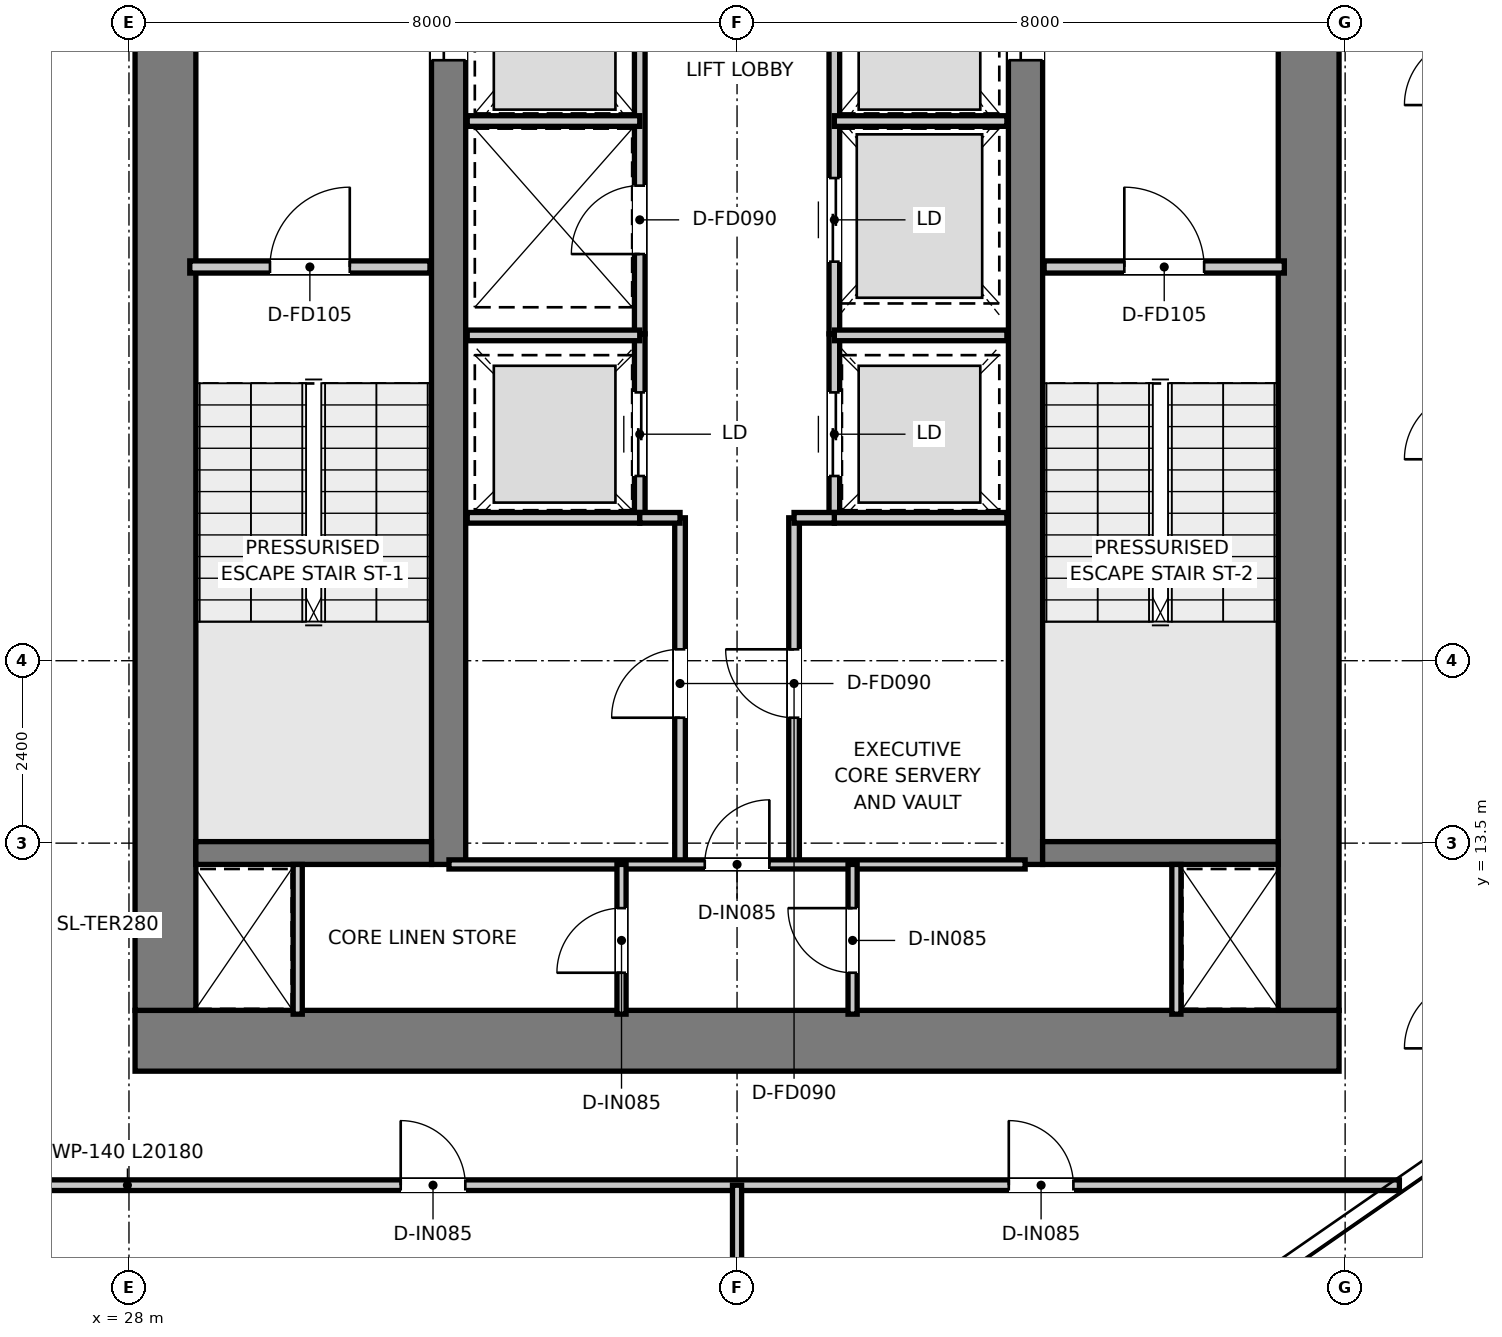
"""IFC4 building model, lengths in metres.
Left out: names, types, materials, properties, quantities, classifications, styles, units other than length and angle.
Written with IfcOpenShell. Run it as: python <this file> out.ifc"""

import sys

from ifc_helpers import new_model, si_unit, direction, frame, frame_2d, origin, place, context, subcontext, project, spatial, rectangle, extrude, element, fill, save


model = new_model("IFC4")
c1 = context("Model", 3, precision=1e-05, world=origin(), true_north=direction((0.0, 1.0)))
c2 = subcontext(c1, "Body", "Model", "MODEL_VIEW")
j1 = project(units=[si_unit("LENGTHUNIT", "METRE"), si_unit("PLANEANGLEUNIT", "RADIAN")], contexts=[c1])
p1 = place(None, origin())
s1 = spatial("IfcSite", under=j1, at=p1, CompositionType="ELEMENT")
p2 = place(p1, origin())
s2 = spatial("IfcBuilding", under=s1, at=p2, CompositionType="ELEMENT")
p3 = place(p2, frame((0.0, 0.0, 271.35)))
s3 = spatial("IfcBuildingStorey", under=s2, at=p3, CompositionType="ELEMENT", Elevation=271.35)
p4 = place(p3, frame((28.08, 10.9, 0.0), z_axis=(0.0, 0.0, 1.0), x_axis=(1.0, 0.0, 0.0)))
e1 = element("IfcWall", 1, at=p4, inside=s3, PredefinedType="SHEAR", context=c2, shape_type="SweptSolid", body=[
    extrude(rectangle(XDim=15.84, YDim=0.8, at=frame_2d((7.92, 0.0))), origin(), (0.0, 0.0, 1.0), 3.95),
])
for number, where, z_axis, x_axis in (
    (2, (28.48, 11.3, 0.0), (0.0, 0.0, 1.0), (0.0, 1.0, 0.0)),
    (3, (43.52, 11.3, 0.0), (0.0, 0.0, 1.0), (0.0, 1.0, 0.0)),
):
    element("IfcWall", number, at=place(p3, frame(where, z_axis=z_axis, x_axis=x_axis)), inside=s3, PredefinedType="SHEAR", context=c2, shape_type="SweptSolid", body=[
        extrude(rectangle(XDim=14.7, YDim=0.8, at=frame_2d((7.35, 0.0))), origin(), (0.0, 0.0, 1.0), 3.95),
    ])
p5 = place(p3, frame((32.205, 13.22, 0.0), z_axis=(0.0, 0.0, 1.0), x_axis=(0.0, 1.0, 0.0)))
e4 = element("IfcWall", 4, at=p5, inside=s3, PredefinedType="SHEAR", context=c2, shape_type="SweptSolid", body=[
    extrude(rectangle(XDim=12.78, YDim=0.45, at=frame_2d((6.39, 0.0))), origin(), (0.0, 0.0, 1.0), 3.95),
])
p6 = place(p5, frame((10.58, 0.0, 0.0)))
e5 = element("IfcOpeningElement", 5, at=p6, cuts=e4, PredefinedType="OPENING", context=c2, shape_type="SweptSolid", body=[
    extrude(rectangle(XDim=1.1, YDim=2.15, at=frame_2d((0.55, 1.075))), frame((0.0, 0.235, 0.0), z_axis=(0.0, -1.0, 0.0), x_axis=(1.0, 0.0, 0.0)), (0.0, 0.0, 1.0), 0.47),
])
p7 = place(p3, frame((39.795, 13.22, 0.0), z_axis=(0.0, 0.0, 1.0), x_axis=(0.0, 1.0, 0.0)))
e6 = element("IfcWall", 6, at=p7, inside=s3, PredefinedType="SHEAR", context=c2, shape_type="SweptSolid", body=[
    extrude(rectangle(XDim=12.78, YDim=0.45, at=frame_2d((6.39, 0.0))), origin(), (0.0, 0.0, 1.0), 3.95),
])
p8 = place(p7, frame((10.58, 0.0, 0.0)))
e7 = element("IfcOpeningElement", 7, at=p8, cuts=e6, PredefinedType="OPENING", context=c2, shape_type="SweptSolid", body=[
    extrude(rectangle(XDim=1.1, YDim=2.15, at=frame_2d((0.55, 1.075))), frame((0.0, 0.235, 0.0), z_axis=(0.0, -1.0, 0.0), x_axis=(1.0, 0.0, 0.0)), (0.0, 0.0, 1.0), 0.47),
])
for number, where, z_axis, x_axis in (
    (8, (28.88, 13.37, 0.0), (0.0, 0.0, 1.0), (1.0, 0.0, 0.0)),
    (9, (40.02, 13.37, 0.0), (0.0, 0.0, 1.0), (1.0, 0.0, 0.0)),
):
    element("IfcWall", number, at=place(p3, frame(where, z_axis=z_axis, x_axis=x_axis)), inside=s3, PredefinedType="SHEAR", context=c2, shape_type="SweptSolid", body=[
        extrude(rectangle(XDim=3.1, YDim=0.3, at=frame_2d((1.55, 0.0))), origin(), (0.0, 0.0, 1.0), 3.95),
    ])
p9 = place(p3, frame((28.8, 21.08, 0.0), z_axis=(0.0, 0.0, 1.0), x_axis=(1.0, 0.0, 0.0)))
e10 = element("IfcWall", 10, at=p9, inside=s3, PredefinedType="PARTITIONING", context=c2, shape_type="SweptSolid", body=[
    extrude(rectangle(XDim=3.16, YDim=0.16, at=frame_2d((1.58, 0.0))), origin(), (0.0, 0.0, 1.0), 3.67),
])
p10 = place(p9, frame((1.055, 0.0, 0.0)))
e11 = element("IfcOpeningElement", 11, at=p10, cuts=e10, PredefinedType="OPENING", context=c2, shape_type="SweptSolid", body=[
    extrude(rectangle(XDim=1.05, YDim=2.1, at=frame_2d((0.525, 1.05))), frame((0.0, 0.09, 0.0), z_axis=(0.0, -1.0, 0.0), x_axis=(1.0, 0.0, 0.0)), (0.0, 0.0, 1.0), 0.18),
])
p11 = place(p3, frame((40.04, 21.08, 0.0), z_axis=(0.0, 0.0, 1.0), x_axis=(1.0, 0.0, 0.0)))
e12 = element("IfcWall", 12, at=p11, inside=s3, PredefinedType="PARTITIONING", context=c2, shape_type="SweptSolid", body=[
    extrude(rectangle(XDim=3.16, YDim=0.16, at=frame_2d((1.58, 0.0))), origin(), (0.0, 0.0, 1.0), 3.67),
])
p12 = place(p11, frame((1.055, 0.0, 0.0)))
e13 = element("IfcOpeningElement", 13, at=p12, cuts=e12, PredefinedType="OPENING", context=c2, shape_type="SweptSolid", body=[
    extrude(rectangle(XDim=1.05, YDim=2.1, at=frame_2d((0.525, 1.05))), frame((0.0, 0.09, 0.0), z_axis=(0.0, -1.0, 0.0), x_axis=(1.0, 0.0, 0.0)), (0.0, 0.0, 1.0), 0.18),
])
p13 = place(p3, frame((34.72, 20.2, 0.0), z_axis=(0.0, 0.0, 1.0), x_axis=(0.0, 1.0, 0.0)))
e14 = element("IfcWall", 14, at=p13, inside=s3, PredefinedType="PARTITIONING", context=c2, shape_type="SweptSolid", body=[
    extrude(rectangle(XDim=5.78, YDim=0.14, at=frame_2d((2.89, 0.0))), origin(), (0.0, 0.0, 1.0), 2.82),
])
p14 = place(p13, frame((1.05, 0.0, 0.0)))
e15 = element("IfcOpeningElement", 15, at=p14, cuts=e14, PredefinedType="OPENING", context=c2, shape_type="SweptSolid", body=[
    extrude(rectangle(XDim=0.9, YDim=2.1, at=frame_2d((0.45, 1.05))), frame((0.0, 0.08, 0.0), z_axis=(0.0, -1.0, 0.0), x_axis=(1.0, 0.0, 0.0)), (0.0, 0.0, 1.0), 0.16),
])
p15 = place(p3, frame((37.28, 20.2, 0.0), z_axis=(0.0, 0.0, 1.0), x_axis=(0.0, 1.0, 0.0)))
e16 = element("IfcWall", 16, at=p15, inside=s3, PredefinedType="PARTITIONING", context=c2, shape_type="SweptSolid", body=[
    extrude(rectangle(XDim=5.78, YDim=0.14, at=frame_2d((2.89, 0.0))), origin(), (0.0, 0.0, 1.0), 2.82),
])
p16 = place(p15, frame((0.95, 0.0, 0.0)))
e17 = element("IfcOpeningElement", 17, at=p16, cuts=e16, PredefinedType="OPENING", context=c2, shape_type="SweptSolid", body=[
    extrude(rectangle(XDim=1.1, YDim=2.15, at=frame_2d((0.55, 1.075))), frame((0.0, 0.08, 0.0), z_axis=(0.0, -1.0, 0.0), x_axis=(1.0, 0.0, 0.0)), (0.0, 0.0, 1.0), 0.16),
])
for number, where, z_axis, x_axis in (
    (18, (32.45, 23.0, 0.0), (0.0, 0.0, 1.0), (1.0, 0.0, 0.0)),
    (19, (37.28, 23.0, 0.0), (0.0, 0.0, 1.0), (1.0, 0.0, 0.0)),
):
    element("IfcWall", number, at=place(p3, frame(where, z_axis=z_axis, x_axis=x_axis)), inside=s3, PredefinedType="PARTITIONING", context=c2, shape_type="SweptSolid", body=[
        extrude(rectangle(XDim=2.27, YDim=0.14, at=frame_2d((1.135, 0.0))), origin(), (0.0, 0.0, 1.0), 2.82),
    ])
p17 = place(p3, frame((34.72, 17.78, 0.0), z_axis=(0.0, 0.0, 1.0), x_axis=(0.0, 1.0, 0.0)))
e20 = element("IfcWall", 20, at=p17, inside=s3, PredefinedType="PARTITIONING", context=c2, shape_type="SweptSolid", body=[
    extrude(rectangle(XDim=2.42, YDim=0.14, at=frame_2d((1.21, 0.0))), origin(), (0.0, 0.0, 1.0), 3.67),
])
p18 = place(p17, frame((0.55, 0.0, 0.0)))
e21 = element("IfcOpeningElement", 21, at=p18, cuts=e20, PredefinedType="OPENING", context=c2, shape_type="SweptSolid", body=[
    extrude(rectangle(XDim=1.1, YDim=2.15, at=frame_2d((0.55, 1.075))), frame((0.0, 0.08, 0.0), z_axis=(0.0, -1.0, 0.0), x_axis=(1.0, 0.0, 0.0)), (0.0, 0.0, 1.0), 0.16),
])
p19 = place(p3, frame((37.28, 17.78, 0.0), z_axis=(0.0, 0.0, 1.0), x_axis=(0.0, 1.0, 0.0)))
e22 = element("IfcWall", 22, at=p19, inside=s3, PredefinedType="PARTITIONING", context=c2, shape_type="SweptSolid", body=[
    extrude(rectangle(XDim=2.42, YDim=0.14, at=frame_2d((1.21, 0.0))), origin(), (0.0, 0.0, 1.0), 3.67),
])
p20 = place(p19, frame((0.55, 0.0, 0.0)))
e23 = element("IfcOpeningElement", 23, at=p20, cuts=e22, PredefinedType="OPENING", context=c2, shape_type="SweptSolid", body=[
    extrude(rectangle(XDim=1.1, YDim=2.15, at=frame_2d((0.55, 1.075))), frame((0.0, 0.08, 0.0), z_axis=(0.0, -1.0, 0.0), x_axis=(1.0, 0.0, 0.0)), (0.0, 0.0, 1.0), 0.16),
])
for number, where, z_axis, x_axis in (
    (24, (32.45, 17.78, 0.0), (0.0, 0.0, 1.0), (1.0, 0.0, 0.0)),
    (25, (32.45, 20.18, 0.0), (0.0, 0.0, 1.0), (1.0, 0.0, 0.0)),
    (26, (37.28, 17.78, 0.0), (0.0, 0.0, 1.0), (1.0, 0.0, 0.0)),
    (27, (37.28, 20.18, 0.0), (0.0, 0.0, 1.0), (1.0, 0.0, 0.0)),
):
    element("IfcWall", number, at=place(p3, frame(where, z_axis=z_axis, x_axis=x_axis)), inside=s3, PredefinedType="PARTITIONING", context=c2, shape_type="SweptSolid", body=[
        extrude(rectangle(XDim=2.27, YDim=0.14, at=frame_2d((1.135, 0.0))), origin(), (0.0, 0.0, 1.0), 3.67),
    ])
p21 = place(p3, frame((35.25, 13.22, 0.0), z_axis=(0.0, 0.0, 1.0), x_axis=(0.0, 1.0, 0.0)))
e28 = element("IfcWall", 28, at=p21, inside=s3, PredefinedType="PARTITIONING", context=c2, shape_type="SweptSolid", body=[
    extrude(rectangle(XDim=4.56, YDim=0.14, at=frame_2d((2.28, 0.0))), origin(), (0.0, 0.0, 1.0), 3.67),
])
p22 = place(p21, frame((1.93, 0.0, 0.0)))
e29 = element("IfcOpeningElement", 29, at=p22, cuts=e28, PredefinedType="OPENING", context=c2, shape_type="SweptSolid", body=[
    extrude(rectangle(XDim=0.9, YDim=2.1, at=frame_2d((0.45, 1.05))), frame((0.0, 0.08, 0.0), z_axis=(0.0, -1.0, 0.0), x_axis=(1.0, 0.0, 0.0)), (0.0, 0.0, 1.0), 0.16),
])
p23 = place(p3, frame((34.72, 17.78, 0.0), z_axis=(0.0, 0.0, 1.0), x_axis=(1.0, 0.0, 0.0)))
e30 = element("IfcWall", 30, at=p23, inside=s3, PredefinedType="PARTITIONING", context=c2, shape_type="SweptSolid", body=[
    extrude(rectangle(XDim=0.53, YDim=0.14, at=frame_2d((0.265, 0.0))), origin(), (0.0, 0.0, 1.0), 3.67),
])
p24 = place(p3, frame((36.75, 13.22, 0.0), z_axis=(0.0, 0.0, 1.0), x_axis=(0.0, 1.0, 0.0)))
e31 = element("IfcWall", 31, at=p24, inside=s3, PredefinedType="PARTITIONING", context=c2, shape_type="SweptSolid", body=[
    extrude(rectangle(XDim=4.56, YDim=0.14, at=frame_2d((2.28, 0.0))), origin(), (0.0, 0.0, 1.0), 3.67),
])
p25 = place(p24, frame((1.93, 0.0, 0.0)))
e32 = element("IfcOpeningElement", 32, at=p25, cuts=e31, PredefinedType="OPENING", context=c2, shape_type="SweptSolid", body=[
    extrude(rectangle(XDim=0.9, YDim=2.1, at=frame_2d((0.45, 1.05))), frame((0.0, 0.08, 0.0), z_axis=(0.0, -1.0, 0.0), x_axis=(1.0, 0.0, 0.0)), (0.0, 0.0, 1.0), 0.16),
])
p26 = place(p3, frame((36.75, 17.78, 0.0), z_axis=(0.0, 0.0, 1.0), x_axis=(1.0, 0.0, 0.0)))
e33 = element("IfcWall", 33, at=p26, inside=s3, PredefinedType="PARTITIONING", context=c2, shape_type="SweptSolid", body=[
    extrude(rectangle(XDim=0.53, YDim=0.14, at=frame_2d((0.265, 0.0))), origin(), (0.0, 0.0, 1.0), 3.67),
])
for number, where, z_axis, x_axis in (
    (34, (30.22, 11.25, 0.0), (0.0, 0.0, 1.0), (0.0, 1.0, 0.0)),
    (35, (41.78, 11.25, 0.0), (0.0, 0.0, 1.0), (0.0, 1.0, 0.0)),
):
    element("IfcWall", number, at=place(p3, frame(where, z_axis=z_axis, x_axis=x_axis)), inside=s3, PredefinedType="PARTITIONING", context=c2, shape_type="SweptSolid", body=[
        extrude(rectangle(XDim=1.97, YDim=0.12, at=frame_2d((0.985, 0.0))), origin(), (0.0, 0.0, 1.0), 3.67),
    ])
p27 = place(p3, frame((32.21, 13.22, 0.0), z_axis=(0.0, 0.0, 1.0), x_axis=(1.0, 0.0, 0.0)))
e36 = element("IfcWall", 36, at=p27, inside=s3, PredefinedType="PARTITIONING", context=c2, shape_type="SweptSolid", body=[
    extrude(rectangle(XDim=7.58, YDim=0.12, at=frame_2d((3.79, 0.0))), origin(), (0.0, 0.0, 1.0), 3.67),
])
p28 = place(p27, frame((3.365, 0.0, 0.0)))
e37 = element("IfcOpeningElement", 37, at=p28, cuts=e36, PredefinedType="OPENING", context=c2, shape_type="SweptSolid", body=[
    extrude(rectangle(XDim=0.85, YDim=2.1, at=frame_2d((0.425, 1.05))), frame((0.0, 0.07, 0.0), z_axis=(0.0, -1.0, 0.0), x_axis=(1.0, 0.0, 0.0)), (0.0, 0.0, 1.0), 0.14),
])
p29 = place(p3, frame((34.48, 11.25, 0.0), z_axis=(0.0, 0.0, 1.0), x_axis=(0.0, 1.0, 0.0)))
e38 = element("IfcWall", 38, at=p29, inside=s3, PredefinedType="PARTITIONING", context=c2, shape_type="SweptSolid", body=[
    extrude(rectangle(XDim=1.97, YDim=0.12, at=frame_2d((0.985, 0.0))), origin(), (0.0, 0.0, 1.0), 3.67),
])
p30 = place(p29, frame((0.545, 0.0, 0.0)))
e39 = element("IfcOpeningElement", 39, at=p30, cuts=e38, PredefinedType="OPENING", context=c2, shape_type="SweptSolid", body=[
    extrude(rectangle(XDim=0.85, YDim=2.1, at=frame_2d((0.425, 1.05))), frame((0.0, 0.07, 0.0), z_axis=(0.0, -1.0, 0.0), x_axis=(1.0, 0.0, 0.0)), (0.0, 0.0, 1.0), 0.14),
])
p31 = place(p3, frame((37.52, 11.25, 0.0), z_axis=(0.0, 0.0, 1.0), x_axis=(0.0, 1.0, 0.0)))
e40 = element("IfcWall", 40, at=p31, inside=s3, PredefinedType="PARTITIONING", context=c2, shape_type="SweptSolid", body=[
    extrude(rectangle(XDim=1.97, YDim=0.12, at=frame_2d((0.985, 0.0))), origin(), (0.0, 0.0, 1.0), 3.67),
])
p32 = place(p31, frame((0.545, 0.0, 0.0)))
e41 = element("IfcOpeningElement", 41, at=p32, cuts=e40, PredefinedType="OPENING", context=c2, shape_type="SweptSolid", body=[
    extrude(rectangle(XDim=0.85, YDim=2.1, at=frame_2d((0.425, 1.05))), frame((0.0, 0.07, 0.0), z_axis=(0.0, -1.0, 0.0), x_axis=(1.0, 0.0, 0.0)), (0.0, 0.0, 1.0), 0.14),
])
p33 = place(p3, frame((24.534, 9.0, 0.0), z_axis=(0.0, 0.0, 1.0), x_axis=(1.0, 0.0, 0.0)))
e42 = element("IfcWall", 42, at=p33, inside=s3, PredefinedType="PARTITIONING", context=c2, shape_type="SweptSolid", body=[
    extrude(rectangle(XDim=20.18, YDim=0.14, at=frame_2d((10.09, 0.0))), origin(), (0.0, 0.0, 1.0), 3.67),
])
p34 = place(p33, frame((7.041, 0.0, 0.0)))
e43 = element("IfcOpeningElement", 43, at=p34, cuts=e42, PredefinedType="OPENING", context=c2, shape_type="SweptSolid", body=[
    extrude(rectangle(XDim=0.85, YDim=2.1, at=frame_2d((0.425, 1.05))), frame((0.0, 0.08, 0.0), z_axis=(0.0, -1.0, 0.0), x_axis=(1.0, 0.0, 0.0)), (0.0, 0.0, 1.0), 0.16),
])
p35 = place(p33, frame((15.041, 0.0, 0.0)))
e44 = element("IfcOpeningElement", 44, at=p35, cuts=e42, PredefinedType="OPENING", context=c2, shape_type="SweptSolid", body=[
    extrude(rectangle(XDim=0.85, YDim=2.1, at=frame_2d((0.425, 1.05))), frame((0.0, 0.08, 0.0), z_axis=(0.0, -1.0, 0.0), x_axis=(1.0, 0.0, 0.0)), (0.0, 0.0, 1.0), 0.16),
])
p36 = place(p3, frame((36.0, 2.955, 0.0), z_axis=(0.0, 0.0, 1.0), x_axis=(0.0, 1.0, 0.0)))
e45 = element("IfcWall", 45, at=p36, inside=s3, PredefinedType="PARTITIONING", context=c2, shape_type="SweptSolid", body=[
    extrude(rectangle(XDim=6.045, YDim=0.12, at=frame_2d((3.022, 0.0))), origin(), (0.0, 0.0, 1.0), 3.67),
])
p37 = place(p10, origin())
e46 = element("IfcDoor", 46, at=p37, inside=s3, OperationType="SINGLE_SWING_RIGHT", PredefinedType="DOOR", context=c2, shape_type="SweptSolid", body=[
    extrude(rectangle(XDim=1.05, YDim=2.1, at=frame_2d((0.525, 1.05))), frame((0.0, 0.025, 0.0), z_axis=(0.0, -1.0, 0.0), x_axis=(1.0, 0.0, 0.0)), (0.0, 0.0, 1.0), 0.05),
])
fill(e11, e46)
p38 = place(p12, origin())
e47 = element("IfcDoor", 47, at=p38, inside=s3, OperationType="SINGLE_SWING_LEFT", PredefinedType="DOOR", context=c2, shape_type="SweptSolid", body=[
    extrude(rectangle(XDim=1.05, YDim=2.1, at=frame_2d((0.525, 1.05))), frame((0.0, 0.025, 0.0), z_axis=(0.0, -1.0, 0.0), x_axis=(1.0, 0.0, 0.0)), (0.0, 0.0, 1.0), 0.05),
])
fill(e13, e47)
p39 = place(p6, origin())
e48 = element("IfcDoor", 48, at=p39, inside=s3, OperationType="DOUBLE_DOOR_SLIDING", PredefinedType="DOOR", context=c2, shape_type="SweptSolid", body=[
    extrude(rectangle(XDim=1.1, YDim=2.15, at=frame_2d((0.55, 1.075))), frame((0.0, 0.025, 0.0), z_axis=(0.0, -1.0, 0.0), x_axis=(1.0, 0.0, 0.0)), (0.0, 0.0, 1.0), 0.05),
])
fill(e5, e48)
p40 = place(p8, origin())
e49 = element("IfcDoor", 49, at=p40, inside=s3, OperationType="DOUBLE_DOOR_SLIDING", PredefinedType="DOOR", context=c2, shape_type="SweptSolid", body=[
    extrude(rectangle(XDim=1.1, YDim=2.15, at=frame_2d((0.55, 1.075))), frame((0.0, 0.025, 0.0), z_axis=(0.0, -1.0, 0.0), x_axis=(1.0, 0.0, 0.0)), (0.0, 0.0, 1.0), 0.05),
])
fill(e7, e49)
p41 = place(p14, origin())
e50 = element("IfcDoor", 50, at=p41, inside=s3, OperationType="SINGLE_SWING_LEFT", PredefinedType="DOOR", context=c2, shape_type="SweptSolid", body=[
    extrude(rectangle(XDim=0.9, YDim=2.1, at=frame_2d((0.45, 1.05))), frame((0.0, 0.025, 0.0), z_axis=(0.0, -1.0, 0.0), x_axis=(1.0, 0.0, 0.0)), (0.0, 0.0, 1.0), 0.05),
])
fill(e15, e50)
p42 = place(p16, origin())
e51 = element("IfcDoor", 51, at=p42, inside=s3, OperationType="DOUBLE_DOOR_SLIDING", PredefinedType="DOOR", context=c2, shape_type="SweptSolid", body=[
    extrude(rectangle(XDim=1.1, YDim=2.15, at=frame_2d((0.55, 1.075))), frame((0.0, 0.025, 0.0), z_axis=(0.0, -1.0, 0.0), x_axis=(1.0, 0.0, 0.0)), (0.0, 0.0, 1.0), 0.05),
])
fill(e17, e51)
p43 = place(p18, origin())
e52 = element("IfcDoor", 52, at=p43, inside=s3, OperationType="DOUBLE_DOOR_SLIDING", PredefinedType="DOOR", context=c2, shape_type="SweptSolid", body=[
    extrude(rectangle(XDim=1.1, YDim=2.15, at=frame_2d((0.55, 1.075))), frame((0.0, 0.025, 0.0), z_axis=(0.0, -1.0, 0.0), x_axis=(1.0, 0.0, 0.0)), (0.0, 0.0, 1.0), 0.05),
])
fill(e21, e52)
p44 = place(p20, origin())
e53 = element("IfcDoor", 53, at=p44, inside=s3, OperationType="DOUBLE_DOOR_SLIDING", PredefinedType="DOOR", context=c2, shape_type="SweptSolid", body=[
    extrude(rectangle(XDim=1.1, YDim=2.15, at=frame_2d((0.55, 1.075))), frame((0.0, 0.025, 0.0), z_axis=(0.0, -1.0, 0.0), x_axis=(1.0, 0.0, 0.0)), (0.0, 0.0, 1.0), 0.05),
])
fill(e23, e53)
p45 = place(p22, origin())
e54 = element("IfcDoor", 54, at=p45, inside=s3, OperationType="SINGLE_SWING_LEFT", PredefinedType="DOOR", context=c2, shape_type="SweptSolid", body=[
    extrude(rectangle(XDim=0.9, YDim=2.1, at=frame_2d((0.45, 1.05))), frame((0.0, 0.025, 0.0), z_axis=(0.0, -1.0, 0.0), x_axis=(1.0, 0.0, 0.0)), (0.0, 0.0, 1.0), 0.05),
])
fill(e29, e54)
p46 = place(p25, origin())
e55 = element("IfcDoor", 55, at=p46, inside=s3, OperationType="SINGLE_SWING_RIGHT", PredefinedType="DOOR", context=c2, shape_type="SweptSolid", body=[
    extrude(rectangle(XDim=0.9, YDim=2.1, at=frame_2d((0.45, 1.05))), frame((0.0, 0.025, 0.0), z_axis=(0.0, -1.0, 0.0), x_axis=(1.0, 0.0, 0.0)), (0.0, 0.0, 1.0), 0.05),
])
fill(e32, e55)
p47 = place(p28, origin())
e56 = element("IfcDoor", 56, at=p47, inside=s3, OperationType="SINGLE_SWING_RIGHT", PredefinedType="DOOR", context=c2, shape_type="SweptSolid", body=[
    extrude(rectangle(XDim=0.85, YDim=2.1, at=frame_2d((0.425, 1.05))), frame((0.0, 0.025, 0.0), z_axis=(0.0, -1.0, 0.0), x_axis=(1.0, 0.0, 0.0)), (0.0, 0.0, 1.0), 0.05),
])
fill(e37, e56)
p48 = place(p30, origin())
e57 = element("IfcDoor", 57, at=p48, inside=s3, OperationType="SINGLE_SWING_LEFT", PredefinedType="DOOR", context=c2, shape_type="SweptSolid", body=[
    extrude(rectangle(XDim=0.85, YDim=2.1, at=frame_2d((0.425, 1.05))), frame((0.0, 0.025, 0.0), z_axis=(0.0, -1.0, 0.0), x_axis=(1.0, 0.0, 0.0)), (0.0, 0.0, 1.0), 0.05),
])
fill(e39, e57)
p49 = place(p32, origin())
e58 = element("IfcDoor", 58, at=p49, inside=s3, OperationType="SINGLE_SWING_RIGHT", PredefinedType="DOOR", context=c2, shape_type="SweptSolid", body=[
    extrude(rectangle(XDim=0.85, YDim=2.1, at=frame_2d((0.425, 1.05))), frame((0.0, 0.025, 0.0), z_axis=(0.0, -1.0, 0.0), x_axis=(1.0, 0.0, 0.0)), (0.0, 0.0, 1.0), 0.05),
])
fill(e41, e58)
p50 = place(p34, origin())
e59 = element("IfcDoor", 59, at=p50, inside=s3, OperationType="SINGLE_SWING_LEFT", PredefinedType="DOOR", context=c2, shape_type="SweptSolid", body=[
    extrude(rectangle(XDim=0.85, YDim=2.1, at=frame_2d((0.425, 1.05))), frame((0.0, 0.025, 0.0), z_axis=(0.0, -1.0, 0.0), x_axis=(1.0, 0.0, 0.0)), (0.0, 0.0, 1.0), 0.05),
])
fill(e43, e59)
p51 = place(p35, origin())
e60 = element("IfcDoor", 60, at=p51, inside=s3, OperationType="SINGLE_SWING_LEFT", PredefinedType="DOOR", context=c2, shape_type="SweptSolid", body=[
    extrude(rectangle(XDim=0.85, YDim=2.1, at=frame_2d((0.425, 1.05))), frame((0.0, 0.025, 0.0), z_axis=(0.0, -1.0, 0.0), x_axis=(1.0, 0.0, 0.0)), (0.0, 0.0, 1.0), 0.05),
])
fill(e44, e60)
save(model, sys.argv[1])
